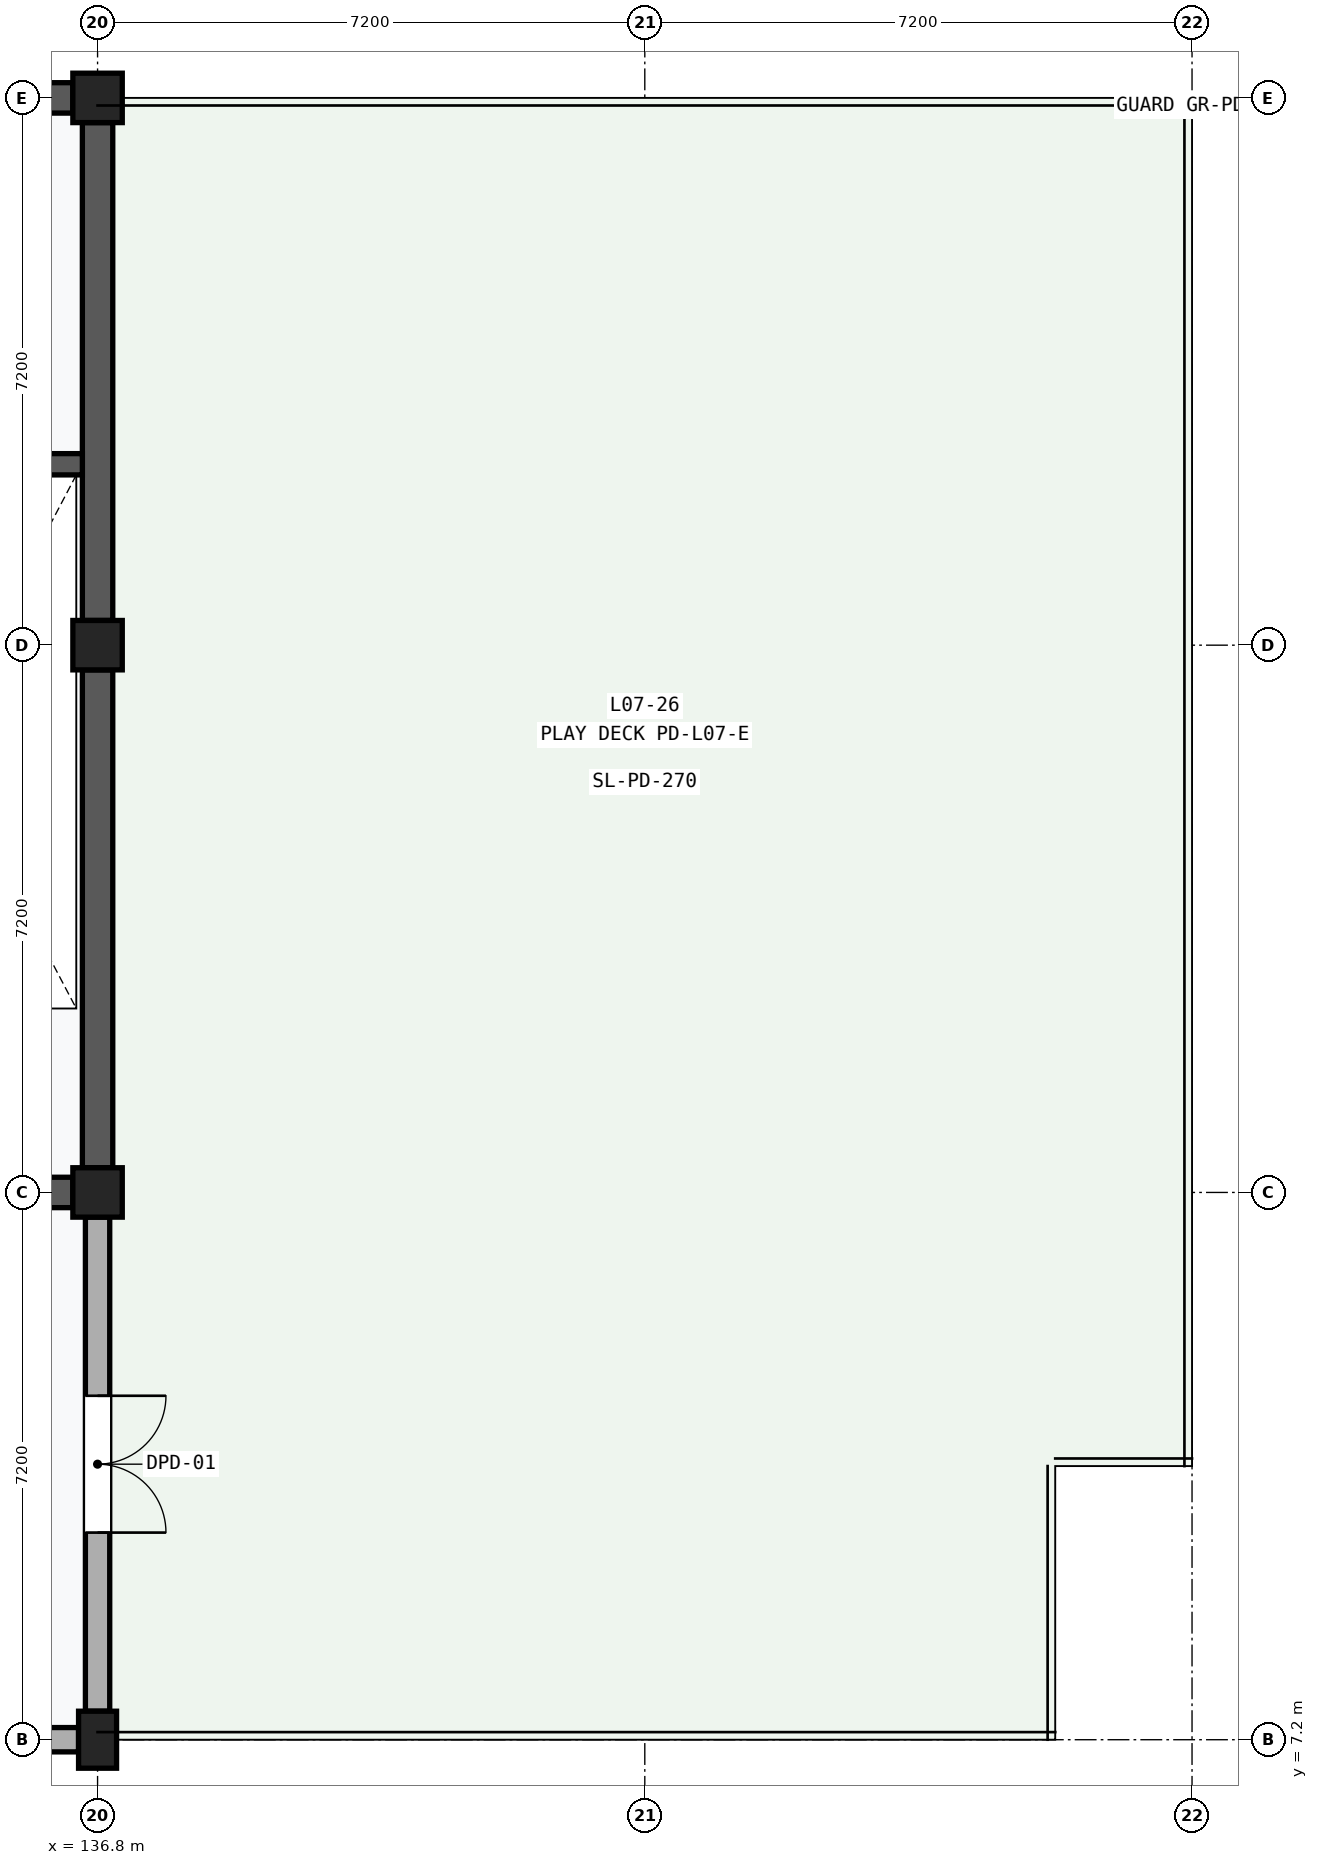
"""IFC4 building model, lengths in metres.
Left out: names, types, materials, properties, quantities, classifications, styles, units other than length and angle.
Written with IfcOpenShell. Run it as: python <this file> out.ifc"""

import sys

from ifc_helpers import new_model, si_unit, direction, frame, frame_2d, origin, origin_2d, place, context, subcontext, project, spatial, rectangle, extrude, element, fill, save


model = new_model("IFC4")
c1 = context("Model", 3, precision=1e-05, world=origin(), true_north=direction((0.0, 1.0)))
c2 = subcontext(c1, "Body", "Model", "MODEL_VIEW")
j1 = project(units=[si_unit("LENGTHUNIT", "METRE"), si_unit("PLANEANGLEUNIT", "RADIAN")], contexts=[c1])
p1 = place(None, origin())
s1 = spatial("IfcSite", under=j1, at=p1, CompositionType="ELEMENT")
p2 = place(p1, origin())
s2 = spatial("IfcBuilding", under=s1, at=p2, CompositionType="ELEMENT")
p3 = place(p2, frame((0.0, 0.0, 30.6)))
s3 = spatial("IfcBuildingStorey", under=s2, at=p3, CompositionType="ELEMENT", Elevation=30.6)
p4 = place(p3, frame((136.8, 7.2, 0.0), z_axis=(0.0, 0.0, 1.0), x_axis=(1.0, 0.0, 0.0)))
e1 = element("IfcColumn", 1, at=p4, inside=s3, PredefinedType="PILASTER", context=c2, shape_type="SweptSolid", body=[
    extrude(rectangle(XDim=0.5, YDim=0.75, at=origin_2d()), origin(), (0.0, 0.0, 1.0), 4.2),
])
for number, where, z_axis, x_axis in (
    (2, (136.8, 14.4, 0.0), (0.0, 0.0, 1.0), (1.0, 0.0, 0.0)),
    (3, (136.8, 21.6, 0.0), (0.0, 0.0, 1.0), (1.0, 0.0, 0.0)),
    (4, (136.8, 28.8, 0.0), (0.0, 0.0, 1.0), (1.0, 0.0, 0.0)),
):
    element("IfcColumn", number, at=place(p3, frame(where, z_axis=z_axis, x_axis=x_axis)), inside=s3, PredefinedType="COLUMN", context=c2, shape_type="SweptSolid", body=[
        extrude(rectangle(XDim=0.65, YDim=0.65, at=origin_2d()), origin(), (0.0, 0.0, 1.0), 4.2),
    ])
p5 = place(p3, frame((129.925, 7.2, 0.0), z_axis=(0.0, 0.0, 1.0), x_axis=(1.0, 0.0, 0.0)))
e5 = element("IfcWall", 5, at=p5, inside=s3, PredefinedType="SOLIDWALL", context=c2, shape_type="SweptSolid", body=[
    extrude(rectangle(XDim=6.625, YDim=0.32, at=frame_2d((3.312, 0.0))), origin(), (0.0, 0.0, 1.0), 3.25),
])
p6 = place(p5, frame((2.212, 0.0, 1.1)))
e6 = element("IfcOpeningElement", 6, at=p6, cuts=e5, PredefinedType="OPENING", context=c2, shape_type="SweptSolid", body=[
    extrude(rectangle(XDim=2.2, YDim=1.5, at=frame_2d((1.1, 0.75))), frame((0.0, 0.172, 0.0), z_axis=(0.0, -1.0, 0.0), x_axis=(1.0, 0.0, 0.0)), (0.0, 0.0, 1.0), 0.344),
])
p7 = place(p3, frame((136.8, 7.575, 0.0), z_axis=(0.0, 0.0, 1.0), x_axis=(0.0, 1.0, 0.0)))
e7 = element("IfcWall", 7, at=p7, inside=s3, PredefinedType="SOLIDWALL", context=c2, shape_type="SweptSolid", body=[
    extrude(rectangle(XDim=6.5, YDim=0.32, at=frame_2d((3.25, 0.0))), origin(), (0.0, 0.0, 1.0), 3.25),
])
p8 = place(p7, frame((2.35, 0.0, 0.0)))
e8 = element("IfcOpeningElement", 8, at=p8, cuts=e7, PredefinedType="OPENING", context=c2, shape_type="SweptSolid", body=[
    extrude(rectangle(XDim=1.8, YDim=2.2, at=frame_2d((0.9, 1.1))), frame((0.0, 0.172, 0.0), z_axis=(0.0, -1.0, 0.0), x_axis=(1.0, 0.0, 0.0)), (0.0, 0.0, 1.0), 0.344),
])
p9 = place(p3, frame((136.8, 14.725, 0.0), z_axis=(0.0, 0.0, 1.0), x_axis=(0.0, 1.0, 0.0)))
e9 = element("IfcWall", 9, at=p9, inside=s3, PredefinedType="SHEAR", context=c2, shape_type="SweptSolid", body=[
    extrude(rectangle(XDim=6.55, YDim=0.4, at=frame_2d((3.275, 0.0))), origin(), (0.0, 0.0, 1.0), 3.25),
])
p10 = place(p3, frame((136.8, 21.925, 0.0), z_axis=(0.0, 0.0, 1.0), x_axis=(0.0, 1.0, 0.0)))
e10 = element("IfcWall", 10, at=p10, inside=s3, PredefinedType="SHEAR", context=c2, shape_type="SweptSolid", body=[
    extrude(rectangle(XDim=6.55, YDim=0.4, at=frame_2d((3.275, 0.0))), origin(), (0.0, 0.0, 1.0), 3.25),
])
p11 = place(p3, frame((129.95, 14.4, 0.0), z_axis=(0.0, 0.0, 1.0), x_axis=(1.0, 0.0, 0.0)))
e11 = element("IfcWall", 11, at=p11, inside=s3, PredefinedType="SHEAR", context=c2, shape_type="SweptSolid", body=[
    extrude(rectangle(XDim=6.525, YDim=0.4, at=frame_2d((3.263, 0.0))), origin(), (0.0, 0.0, 1.0), 3.18),
])
p12 = place(p11, frame((0.43, 0.0, 0.0)))
e12 = element("IfcOpeningElement", 12, at=p12, cuts=e11, PredefinedType="OPENING", context=c2, shape_type="SweptSolid", body=[
    extrude(rectangle(XDim=1.6, YDim=2.2, at=frame_2d((0.8, 1.1))), frame((0.0, 0.212, 0.0), z_axis=(0.0, -1.0, 0.0), x_axis=(1.0, 0.0, 0.0)), (0.0, 0.0, 1.0), 0.424),
])
p13 = place(p3, frame((129.925, 28.8, 0.0), z_axis=(0.0, 0.0, 1.0), x_axis=(1.0, 0.0, 0.0)))
e13 = element("IfcWall", 13, at=p13, inside=s3, PredefinedType="SHEAR", context=c2, shape_type="SweptSolid", body=[
    extrude(rectangle(XDim=6.55, YDim=0.4, at=frame_2d((3.275, 0.0))), origin(), (0.0, 0.0, 1.0), 3.25),
])
p14 = place(p3, frame((132.82, 23.98, 0.0), z_axis=(0.0, 0.0, 1.0), x_axis=(1.0, 0.0, 0.0)))
e14 = element("IfcWall", 14, at=p14, inside=s3, PredefinedType="SHEAR", context=c2, shape_type="SweptSolid", body=[
    extrude(rectangle(XDim=3.78, YDim=0.28, at=frame_2d((1.89, 0.0))), origin(), (0.0, 0.0, 1.0), 3.88),
])
p15 = place(p8, frame((1.8, 0.0, 0.0), z_axis=(0.0, 0.0, 1.0), x_axis=(-1.0, 0.0, 0.0)))
e15 = element("IfcDoor", 15, at=p15, inside=s3, OperationType="DOUBLE_DOOR_SINGLE_SWING", PredefinedType="DOOR", context=c2, shape_type="SweptSolid", body=[
    extrude(rectangle(XDim=1.8, YDim=2.2, at=frame_2d((0.9, 1.1))), frame((0.0, 0.025, 0.0), z_axis=(0.0, -1.0, 0.0), x_axis=(1.0, 0.0, 0.0)), (0.0, 0.0, 1.0), 0.05),
])
fill(e8, e15)
save(model, sys.argv[1])
